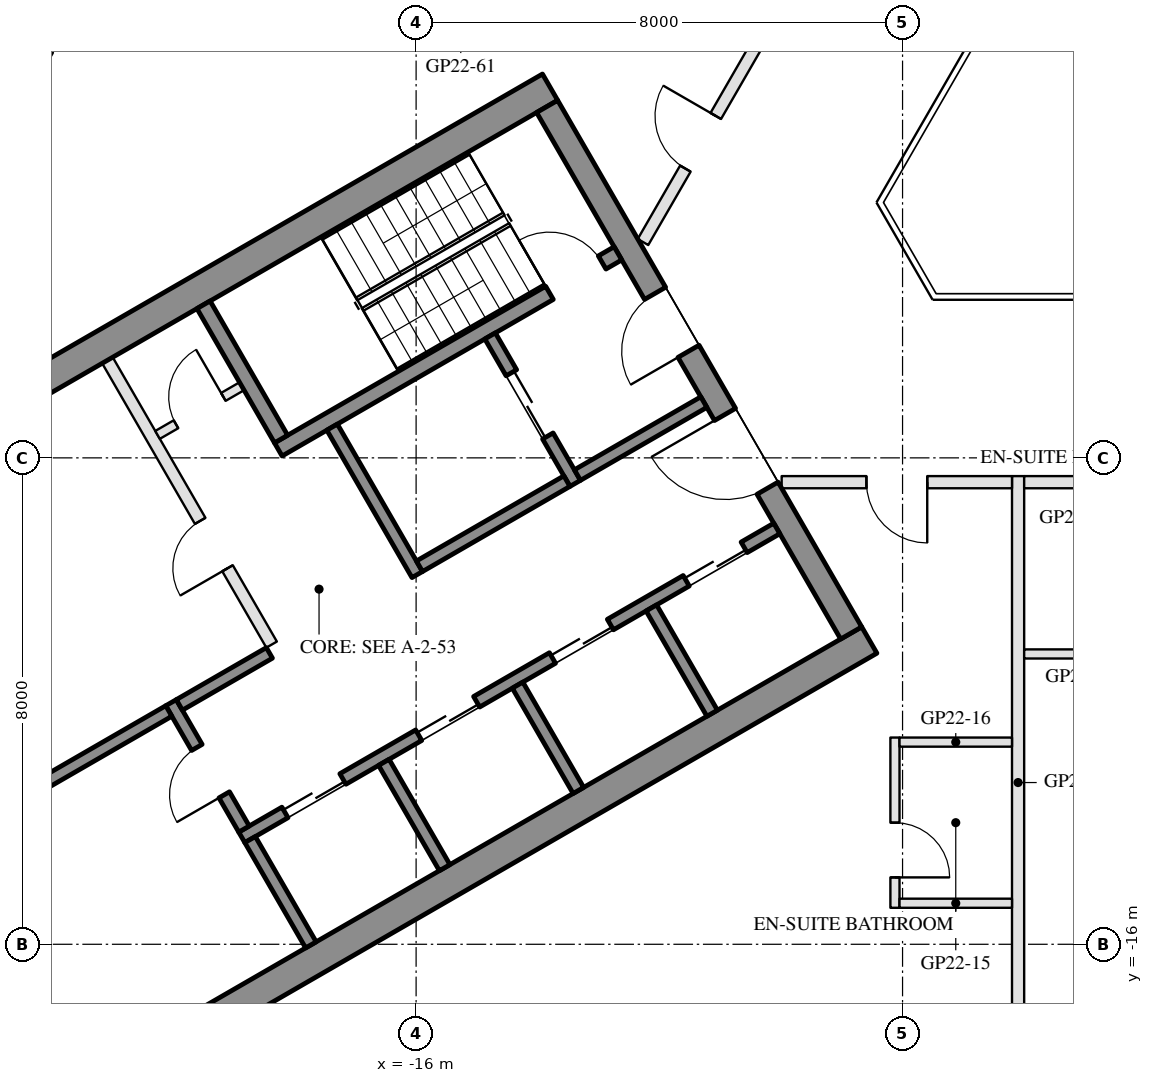
"""IFC4 building model, lengths in metres.
Left out: names, types, materials, properties, quantities, classifications, styles, units other than length and angle.
Written with IfcOpenShell. Run it as: python <this file> out.ifc"""

import sys

from ifc_helpers import new_model, si_unit, direction, frame, frame_2d, origin, place, context, subcontext, project, spatial, rectangle, extrude, element, fill, save


model = new_model("IFC4")
c1 = context("Model", 3, precision=1e-05, world=origin(), true_north=direction((0.0, 1.0)))
c2 = subcontext(c1, "Body", "Model", "MODEL_VIEW")
j1 = project(units=[si_unit("LENGTHUNIT", "METRE"), si_unit("PLANEANGLEUNIT", "RADIAN")], contexts=[c1])
p1 = place(None, origin())
s1 = spatial("IfcSite", under=j1, at=p1, CompositionType="ELEMENT")
p2 = place(p1, origin())
s2 = spatial("IfcBuilding", under=s1, at=p2, CompositionType="ELEMENT")
p3 = place(p2, frame((0.0, 0.0, 228.0)))
s3 = spatial("IfcBuildingStorey", under=s2, at=p3, CompositionType="ELEMENT", Elevation=228.0)
p4 = place(p3, frame((-20.309, 1.934, 0.0), z_axis=(0.0, 0.0, 1.0), x_axis=(-0.499992114976, -0.866029956157, 0.0)))
e1 = element("IfcWall", 1, at=p4, inside=s3, PredefinedType="SOLIDWALL", context=c2, shape_type="SweptSolid", body=[
    extrude(rectangle(XDim=6.74, YDim=0.35, at=frame_2d((3.37, 0.0))), origin(), (0.0, 0.0, 1.0), 3.45),
])
p5 = place(p4, frame((4.02, 0.0, 0.0)))
e2 = element("IfcOpeningElement", 2, at=p5, cuts=e1, PredefinedType="OPENING", context=c2, shape_type="SweptSolid", body=[
    extrude(rectangle(XDim=2.4, YDim=2.4, at=frame_2d((1.2, 1.2))), frame((0.0, 0.185, 0.0), z_axis=(0.0, -1.0, 0.0), x_axis=(1.0, 0.0, 0.0)), (0.0, 0.0, 1.0), 0.37),
])
p6 = place(p4, frame((0.77, 0.0, 0.3)))
e3 = element("IfcOpeningElement", 3, at=p6, cuts=e1, PredefinedType="OPENING", context=c2, shape_type="SweptSolid", body=[
    extrude(rectangle(XDim=2.9, YDim=2.65, at=frame_2d((1.45, 1.325))), frame((0.0, 0.185, 0.0), z_axis=(0.0, -1.0, 0.0), x_axis=(1.0, 0.0, 0.0)), (0.0, 0.0, 1.0), 0.37),
])
for number, where, z_axis, x_axis in (
    (4, (-13.797, -1.903, 0.0), (0.0, 0.0, 1.0), (-0.866, -0.5, 0.0)),
    (5, (-8.547, -10.997, 0.0), (0.0, 0.0, 1.0), (-0.866, -0.5, 0.0)),
):
    element("IfcWall", number, at=place(p3, frame(where, z_axis=z_axis, x_axis=x_axis)), inside=s3, PredefinedType="SHEAR", context=c2, shape_type="SweptSolid", body=[
        extrude(rectangle(XDim=14.837, YDim=0.5, at=frame_2d((7.418, 0.0))), origin(), (0.0, 0.0, 1.0), 3.45),
    ])
p7 = place(p3, frame((-13.845, -2.22, 0.0), z_axis=(0.0, 0.0, 1.0), x_axis=(0.500004234368, -0.866022959057, 0.0)))
e6 = element("IfcWall", 6, at=p7, inside=s3, PredefinedType="SHEAR", context=c2, shape_type="SweptSolid", body=[
    extrude(rectangle(XDim=10.0, YDim=0.4, at=frame_2d((5.0, 0.0))), origin(), (0.0, 0.0, 1.0), 3.45),
])
p8 = place(p7, frame((3.55, 0.0, 0.0)))
e7 = element("IfcOpeningElement", 7, at=p8, cuts=e6, PredefinedType="OPENING", context=c2, shape_type="SweptSolid", body=[
    extrude(rectangle(XDim=1.1, YDim=2.1, at=frame_2d((0.55, 1.05))), frame((0.0, 0.21, 0.0), z_axis=(0.0, -1.0, 0.0), x_axis=(1.0, 0.0, 0.0)), (0.0, 0.0, 1.0), 0.42),
])
p9 = place(p7, frame((5.85, 0.0, 0.0)))
e8 = element("IfcOpeningElement", 8, at=p9, cuts=e6, PredefinedType="OPENING", context=c2, shape_type="SweptSolid", body=[
    extrude(rectangle(XDim=1.4, YDim=2.1, at=frame_2d((0.7, 1.05))), frame((0.0, 0.21, 0.0), z_axis=(0.0, -1.0, 0.0), x_axis=(1.0, 0.0, 0.0)), (0.0, 0.0, 1.0), 0.42),
])
p10 = place(p3, frame((-12.681, -4.636, 0.0), z_axis=(0.0, 0.0, 1.0), x_axis=(-0.866021702275, -0.500006411147, 0.0)))
e9 = element("IfcWall", 9, at=p10, inside=s3, PredefinedType="SHEAR", context=c2, shape_type="SweptSolid", body=[
    extrude(rectangle(XDim=6.45, YDim=0.25, at=frame_2d((3.225, 0.0))), origin(), (0.0, 0.0, 1.0), 3.45),
])
p11 = place(p10, frame((0.3, 0.0, 0.0)))
e10 = element("IfcOpeningElement", 10, at=p11, cuts=e9, PredefinedType="OPENING", context=c2, shape_type="SweptSolid", body=[
    extrude(rectangle(XDim=1.0, YDim=2.1, at=frame_2d((0.5, 1.05))), frame((0.0, 0.135, 0.0), z_axis=(0.0, -1.0, 0.0), x_axis=(1.0, 0.0, 0.0)), (0.0, 0.0, 1.0), 0.27),
])
p12 = place(p3, frame((-19.496, -5.482, 0.0), z_axis=(0.0, 0.0, 1.0), x_axis=(0.499990435942, -0.866030925526, 0.0)))
e11 = element("IfcWall", 11, at=p12, inside=s3, PredefinedType="SHEAR", context=c2, shape_type="SweptSolid", body=[
    extrude(rectangle(XDim=2.55, YDim=0.25, at=frame_2d((1.275, 0.0))), origin(), (0.0, 0.0, 1.0), 3.45),
])
p13 = place(p3, frame((-17.381, -7.495, 0.0), z_axis=(0.0, 0.0, 1.0), x_axis=(0.500011755427, -0.866018616679, 0.0)))
e12 = element("IfcWall", 12, at=p13, inside=s3, PredefinedType="SHEAR", context=c2, shape_type="SweptSolid", body=[
    extrude(rectangle(XDim=2.8, YDim=0.2, at=frame_2d((1.4, 0.0))), origin(), (0.0, 0.0, 1.0), 3.45),
])
p14 = place(p3, frame((-14.783, -5.995, 0.0), z_axis=(0.0, 0.0, 1.0), x_axis=(0.49994636267, -0.866056369097, 0.0)))
e13 = element("IfcWall", 13, at=p14, inside=s3, PredefinedType="SHEAR", context=c2, shape_type="SweptSolid", body=[
    extrude(rectangle(XDim=2.8, YDim=0.2, at=frame_2d((1.4, 0.0))), origin(), (0.0, 0.0, 1.0), 3.45),
])
p15 = place(p14, frame((0.7, 0.0, 0.0)))
e14 = element("IfcOpeningElement", 14, at=p15, cuts=e13, PredefinedType="OPENING", context=c2, shape_type="SweptSolid", body=[
    extrude(rectangle(XDim=1.2, YDim=2.1, at=frame_2d((0.6, 1.05))), frame((0.0, 0.11, 0.0), z_axis=(0.0, -1.0, 0.0), x_axis=(1.0, 0.0, 0.0)), (0.0, 0.0, 1.0), 0.22),
])
p16 = place(p3, frame((-13.52, -8.383, 0.0), z_axis=(0.0, 0.0, 1.0), x_axis=(-0.866034573852, -0.49998411664, 0.0)))
e15 = element("IfcWall", 15, at=p16, inside=s3, PredefinedType="SHEAR", context=c2, shape_type="SweptSolid", body=[
    extrude(rectangle(XDim=2.8, YDim=0.2, at=frame_2d((1.4, 0.0))), origin(), (0.0, 0.0, 1.0), 3.45),
])
p17 = place(p3, frame((-11.268, -7.083, 0.0), z_axis=(0.0, 0.0, 1.0), x_axis=(-0.866050077142, -0.499957262057, 0.0)))
e16 = element("IfcWall", 16, at=p17, inside=s3, PredefinedType="SHEAR", context=c2, shape_type="SweptSolid", body=[
    extrude(rectangle(XDim=2.4, YDim=0.2, at=frame_2d((1.2, 0.0))), origin(), (0.0, 0.0, 1.0), 3.45),
])
p18 = place(p3, frame((-10.068, -9.162, 0.0), z_axis=(0.0, 0.0, 1.0), x_axis=(-0.866032725843, -0.499987317609, 0.0)))
e17 = element("IfcWall", 17, at=p18, inside=s3, PredefinedType="SHEAR", context=c2, shape_type="SweptSolid", body=[
    extrude(rectangle(XDim=10.16, YDim=0.2, at=frame_2d((5.08, 0.0))), origin(), (0.0, 0.0, 1.0), 3.45),
])
p19 = place(p18, frame((0.62, 0.0, 0.0)))
e18 = element("IfcOpeningElement", 18, at=p19, cuts=e17, PredefinedType="OPENING", context=c2, shape_type="SweptSolid", body=[
    extrude(rectangle(XDim=1.1, YDim=2.1, at=frame_2d((0.55, 1.05))), frame((0.0, 0.11, 0.0), z_axis=(0.0, -1.0, 0.0), x_axis=(1.0, 0.0, 0.0)), (0.0, 0.0, 1.0), 0.22),
])
p20 = place(p18, frame((3.16, 0.0, 0.0)))
e19 = element("IfcOpeningElement", 19, at=p20, cuts=e17, PredefinedType="OPENING", context=c2, shape_type="SweptSolid", body=[
    extrude(rectangle(XDim=1.1, YDim=2.1, at=frame_2d((0.55, 1.05))), frame((0.0, 0.11, 0.0), z_axis=(0.0, -1.0, 0.0), x_axis=(1.0, 0.0, 0.0)), (0.0, 0.0, 1.0), 0.22),
])
p21 = place(p18, frame((5.7, 0.0, 0.0)))
e20 = element("IfcOpeningElement", 20, at=p21, cuts=e17, PredefinedType="OPENING", context=c2, shape_type="SweptSolid", body=[
    extrude(rectangle(XDim=1.1, YDim=2.1, at=frame_2d((0.55, 1.05))), frame((0.0, 0.11, 0.0), z_axis=(0.0, -1.0, 0.0), x_axis=(1.0, 0.0, 0.0)), (0.0, 0.0, 1.0), 0.22),
])
p22 = place(p18, frame((8.24, 0.0, 0.0)))
e21 = element("IfcOpeningElement", 21, at=p22, cuts=e17, PredefinedType="OPENING", context=c2, shape_type="SweptSolid", body=[
    extrude(rectangle(XDim=1.1, YDim=2.1, at=frame_2d((0.55, 1.05))), frame((0.0, 0.11, 0.0), z_axis=(0.0, -1.0, 0.0), x_axis=(1.0, 0.0, 0.0)), (0.0, 0.0, 1.0), 0.22),
])
p23 = place(p3, frame((-20.031, -12.026, 0.0), z_axis=(0.0, 0.0, 1.0), x_axis=(0.500033551112, -0.866006032174, 0.0)))
e22 = element("IfcWall", 22, at=p23, inside=s3, PredefinedType="SHEAR", context=c2, shape_type="SweptSolid", body=[
    extrude(rectangle(XDim=2.4, YDim=0.2, at=frame_2d((1.2, 0.0))), origin(), (0.0, 0.0, 1.0), 3.45),
])
p24 = place(p23, frame((0.85, 0.0, 0.0)))
e23 = element("IfcOpeningElement", 23, at=p24, cuts=e22, PredefinedType="OPENING", context=c2, shape_type="SweptSolid", body=[
    extrude(rectangle(XDim=0.9, YDim=2.1, at=frame_2d((0.45, 1.05))), frame((0.0, 0.11, 0.0), z_axis=(0.0, -1.0, 0.0), x_axis=(1.0, 0.0, 0.0)), (0.0, 0.0, 1.0), 0.22),
])
p25 = place(p3, frame((-18.413, -11.208, 0.0), z_axis=(0.0, 0.0, 1.0), x_axis=(-0.866038183914, -0.499977863513, 0.0)))
e24 = element("IfcWall", 24, at=p25, inside=s3, PredefinedType="SHEAR", context=c2, shape_type="SweptSolid", body=[
    extrude(rectangle(XDim=1.71, YDim=0.2, at=frame_2d((0.855, 0.0))), origin(), (0.0, 0.0, 1.0), 3.45),
])
for number, where, z_axis, x_axis in (
    (25, (-12.131, -10.468, 0.0), (0.0, 0.0, 1.0), (0.5, -0.866, 0.0)),
    (26, (-14.331, -11.738, 0.0), (0.0, 0.0, 1.0), (0.5, -0.866, 0.0)),
    (27, (-16.531, -13.008, 0.0), (0.0, 0.0, 1.0), (0.5, -0.866, 0.0)),
    (28, (-18.73, -14.278, 0.0), (0.0, 0.0, 1.0), (0.5, -0.866, 0.0)),
):
    element("IfcWall", number, at=place(p3, frame(where, z_axis=z_axis, x_axis=x_axis)), inside=s3, PredefinedType="SHEAR", context=c2, shape_type="SweptSolid", body=[
        extrude(rectangle(XDim=2.0, YDim=0.2, at=frame_2d((1.0, 0.0))), origin(), (0.0, 0.0, 1.0), 3.45),
    ])
p26 = place(p3, frame((-20.067, -12.163, 0.0), z_axis=(0.0, 0.0, 1.0), x_axis=(-0.866055327414, -0.49994816717, 0.0)))
e29 = element("IfcWall", 29, at=p26, inside=s3, PredefinedType="SHEAR", context=c2, shape_type="SweptSolid", body=[
    extrude(rectangle(XDim=2.84, YDim=0.2, at=frame_2d((1.42, 0.0))), origin(), (0.0, 0.0, 1.0), 3.45),
])
p27 = place(p3, frame((-21.076, -6.395, 0.0), z_axis=(0.0, 0.0, 1.0), x_axis=(0.50001468107, -0.866016927499, 0.0)))
e30 = element("IfcWall", 30, at=p27, inside=s3, PredefinedType="PARTITIONING", context=c2, shape_type="SweptSolid", body=[
    extrude(rectangle(XDim=5.4, YDim=0.2, at=frame_2d((2.7, 0.0))), origin(), (0.0, 0.0, 1.0), 3.45),
])
p28 = place(p27, frame((3.05, 0.0, 0.0)))
e31 = element("IfcOpeningElement", 31, at=p28, cuts=e30, PredefinedType="OPENING", context=c2, shape_type="SweptSolid", body=[
    extrude(rectangle(XDim=0.9, YDim=2.1, at=frame_2d((0.45, 1.05))), frame((0.0, 0.11, 0.0), z_axis=(0.0, -1.0, 0.0), x_axis=(1.0, 0.0, 0.0)), (0.0, 0.0, 1.0), 0.22),
])
p29 = place(p3, frame((-18.866, -6.822, 0.0), z_axis=(0.0, 0.0, 1.0), x_axis=(-0.866028054938, -0.499995408039, 0.0)))
e32 = element("IfcWall", 32, at=p29, inside=s3, PredefinedType="PARTITIONING", context=c2, shape_type="SweptSolid", body=[
    extrude(rectangle(XDim=1.6, YDim=0.15, at=frame_2d((0.8, 0.0))), origin(), (0.0, 0.0, 1.0), 3.45),
])
p30 = place(p29, frame((0.35, 0.0, 0.0)))
e33 = element("IfcOpeningElement", 33, at=p30, cuts=e32, PredefinedType="OPENING", context=c2, shape_type="SweptSolid", body=[
    extrude(rectangle(XDim=0.9, YDim=2.1, at=frame_2d((0.45, 1.05))), frame((0.0, 0.085, 0.0), z_axis=(0.0, -1.0, 0.0), x_axis=(1.0, 0.0, 0.0)), (0.0, 0.0, 1.0), 0.17),
])
p31 = place(p3, frame((-6.1, -18.38, 0.0), z_axis=(0.0, 0.0, 1.0), x_axis=(0.0, 1.0, 0.0)))
e34 = element("IfcWall", 34, at=p31, inside=s3, PredefinedType="PARTITIONING", context=c2, shape_type="SweptSolid", body=[
    extrude(rectangle(XDim=10.08, YDim=0.2, at=frame_2d((5.04, 0.0))), origin(), (0.0, 0.0, 1.0), 2.96),
])
p32 = place(p3, frame((-6.2, -8.4, 0.0), z_axis=(0.0, 0.0, 1.0), x_axis=(-1.0, 0.0, 0.0)))
e35 = element("IfcWall", 35, at=p32, inside=s3, PredefinedType="PARTITIONING", context=c2, shape_type="SweptSolid", body=[
    extrude(rectangle(XDim=3.788, YDim=0.2, at=frame_2d((1.894, 0.0))), origin(), (0.0, 0.0, 1.0), 2.76),
])
p33 = place(p32, frame((1.394, 0.0, 0.0)))
e36 = element("IfcOpeningElement", 36, at=p33, cuts=e35, PredefinedType="OPENING", context=c2, shape_type="SweptSolid", body=[
    extrude(rectangle(XDim=1.0, YDim=2.1, at=frame_2d((0.5, 1.05))), frame((0.0, 0.11, 0.0), z_axis=(0.0, -1.0, 0.0), x_axis=(1.0, 0.0, 0.0)), (0.0, 0.0, 1.0), 0.22),
])
p34 = place(p3, frame((-8.125, -12.6, 0.0), z_axis=(0.0, 0.0, 1.0), x_axis=(0.0, -1.0, 0.0)))
e37 = element("IfcWall", 37, at=p34, inside=s3, PredefinedType="PARTITIONING", context=c2, shape_type="SweptSolid", body=[
    extrude(rectangle(XDim=2.8, YDim=0.15, at=frame_2d((1.4, 0.0))), origin(), (0.0, 0.0, 1.0), 3.45),
])
p35 = place(p34, frame((1.4, 0.0, 0.0)))
e38 = element("IfcOpeningElement", 38, at=p35, cuts=e37, PredefinedType="OPENING", context=c2, shape_type="SweptSolid", body=[
    extrude(rectangle(XDim=0.9, YDim=2.1, at=frame_2d((0.45, 1.05))), frame((0.0, 0.085, 0.0), z_axis=(0.0, -1.0, 0.0), x_axis=(1.0, 0.0, 0.0)), (0.0, 0.0, 1.0), 0.17),
])
for number, where, z_axis, x_axis in (
    (39, (-8.05, -15.325, 0.0), (0.0, 0.0, 1.0), (1.0, 0.0, 0.0)),
    (40, (-8.05, -12.675, 0.0), (0.0, 0.0, 1.0), (1.0, 0.0, 0.0)),
):
    element("IfcWall", number, at=place(p3, frame(where, z_axis=z_axis, x_axis=x_axis)), inside=s3, PredefinedType="PARTITIONING", context=c2, shape_type="SweptSolid", body=[
        extrude(rectangle(XDim=1.85, YDim=0.15, at=frame_2d((0.925, 0.0))), origin(), (0.0, 0.0, 1.0), 2.76),
    ])
p36 = place(p3, frame((-2.1, -8.4, 0.0), z_axis=(0.0, 0.0, 1.0), x_axis=(-1.0, 0.0, 0.0)))
e41 = element("IfcWall", 41, at=p36, inside=s3, PredefinedType="PARTITIONING", context=c2, shape_type="SweptSolid", body=[
    extrude(rectangle(XDim=3.9, YDim=0.2, at=frame_2d((1.95, 0.0))), origin(), (0.0, 0.0, 1.0), 2.76),
])
p37 = place(p36, frame((0.45, 0.0, 0.0)))
e42 = element("IfcOpeningElement", 42, at=p37, cuts=e41, PredefinedType="OPENING", context=c2, shape_type="SweptSolid", body=[
    extrude(rectangle(XDim=1.0, YDim=2.1, at=frame_2d((0.5, 1.05))), frame((0.0, 0.11, 0.0), z_axis=(0.0, -1.0, 0.0), x_axis=(1.0, 0.0, 0.0)), (0.0, 0.0, 1.0), 0.22),
])
p38 = place(p3, frame((-6.0, -11.225, 0.0), z_axis=(0.0, 0.0, 1.0), x_axis=(1.0, 0.0, 0.0)))
e43 = element("IfcWall", 43, at=p38, inside=s3, PredefinedType="PARTITIONING", context=c2, shape_type="SweptSolid", body=[
    extrude(rectangle(XDim=1.85, YDim=0.15, at=frame_2d((0.925, 0.0))), origin(), (0.0, 0.0, 1.0), 3.45),
])
p39 = place(p3, frame((-12.269, -4.45, 0.0), z_axis=(0.0, 0.0, 1.0), x_axis=(0.500055316652, 0.865993464345, 0.0)))
e44 = element("IfcWall", 44, at=p39, inside=s3, PredefinedType="PARTITIONING", context=c2, shape_type="SweptSolid", body=[
    extrude(rectangle(XDim=3.788, YDim=0.2, at=frame_2d((1.894, 0.0))), origin(), (0.0, 0.0, 1.0), 2.76),
])
p40 = place(p39, frame((1.394, 0.0, 0.0)))
e45 = element("IfcOpeningElement", 45, at=p40, cuts=e44, PredefinedType="OPENING", context=c2, shape_type="SweptSolid", body=[
    extrude(rectangle(XDim=1.0, YDim=2.1, at=frame_2d((0.5, 1.05))), frame((0.0, 0.11, 0.0), z_axis=(0.0, -1.0, 0.0), x_axis=(1.0, 0.0, 0.0)), (0.0, 0.0, 1.0), 0.22),
])
p41 = place(p15, origin())
e46 = element("IfcDoor", 46, at=p41, inside=s3, OperationType="DOUBLE_DOOR_SLIDING", PredefinedType="DOOR", context=c2, shape_type="SweptSolid", body=[
    extrude(rectangle(XDim=1.2, YDim=2.1, at=frame_2d((0.6, 1.05))), frame((0.0, 0.025, 0.0), z_axis=(0.0, -1.0, 0.0), x_axis=(1.0, 0.0, 0.0)), (0.0, 0.0, 1.0), 0.05),
])
fill(e14, e46)
p42 = place(p30, frame((0.9, 0.0, 0.0), z_axis=(0.0, 0.0, 1.0), x_axis=(-1.0, 0.0, 0.0)))
e47 = element("IfcDoor", 47, at=p42, inside=s3, OperationType="SINGLE_SWING_RIGHT", PredefinedType="DOOR", context=c2, shape_type="SweptSolid", body=[
    extrude(rectangle(XDim=0.9, YDim=2.1, at=frame_2d((0.45, 1.05))), frame((0.0, 0.025, 0.0), z_axis=(0.0, -1.0, 0.0), x_axis=(1.0, 0.0, 0.0)), (0.0, 0.0, 1.0), 0.05),
])
fill(e33, e47)
p43 = place(p19, origin())
e48 = element("IfcDoor", 48, at=p43, inside=s3, OperationType="DOUBLE_DOOR_SLIDING", PredefinedType="DOOR", context=c2, shape_type="SweptSolid", body=[
    extrude(rectangle(XDim=1.1, YDim=2.1, at=frame_2d((0.55, 1.05))), frame((0.0, 0.025, 0.0), z_axis=(0.0, -1.0, 0.0), x_axis=(1.0, 0.0, 0.0)), (0.0, 0.0, 1.0), 0.05),
])
fill(e18, e48)
p44 = place(p20, origin())
e49 = element("IfcDoor", 49, at=p44, inside=s3, OperationType="DOUBLE_DOOR_SLIDING", PredefinedType="DOOR", context=c2, shape_type="SweptSolid", body=[
    extrude(rectangle(XDim=1.1, YDim=2.1, at=frame_2d((0.55, 1.05))), frame((0.0, 0.025, 0.0), z_axis=(0.0, -1.0, 0.0), x_axis=(1.0, 0.0, 0.0)), (0.0, 0.0, 1.0), 0.05),
])
fill(e19, e49)
p45 = place(p21, origin())
e50 = element("IfcDoor", 50, at=p45, inside=s3, OperationType="DOUBLE_DOOR_SLIDING", PredefinedType="DOOR", context=c2, shape_type="SweptSolid", body=[
    extrude(rectangle(XDim=1.1, YDim=2.1, at=frame_2d((0.55, 1.05))), frame((0.0, 0.025, 0.0), z_axis=(0.0, -1.0, 0.0), x_axis=(1.0, 0.0, 0.0)), (0.0, 0.0, 1.0), 0.05),
])
fill(e20, e50)
p46 = place(p22, origin())
e51 = element("IfcDoor", 51, at=p46, inside=s3, OperationType="DOUBLE_DOOR_SLIDING", PredefinedType="DOOR", context=c2, shape_type="SweptSolid", body=[
    extrude(rectangle(XDim=1.1, YDim=2.1, at=frame_2d((0.55, 1.05))), frame((0.0, 0.025, 0.0), z_axis=(0.0, -1.0, 0.0), x_axis=(1.0, 0.0, 0.0)), (0.0, 0.0, 1.0), 0.05),
])
fill(e21, e51)
p47 = place(p24, frame((0.9, 0.0, 0.0), z_axis=(0.0, 0.0, 1.0), x_axis=(-1.0, 0.0, 0.0)))
e52 = element("IfcDoor", 52, at=p47, inside=s3, OperationType="SINGLE_SWING_LEFT", PredefinedType="DOOR", context=c2, shape_type="SweptSolid", body=[
    extrude(rectangle(XDim=0.9, YDim=2.1, at=frame_2d((0.45, 1.05))), frame((0.0, 0.025, 0.0), z_axis=(0.0, -1.0, 0.0), x_axis=(1.0, 0.0, 0.0)), (0.0, 0.0, 1.0), 0.05),
])
fill(e23, e52)
p48 = place(p28, frame((0.9, 0.0, 0.0), z_axis=(0.0, 0.0, 1.0), x_axis=(-1.0, 0.0, 0.0)))
e53 = element("IfcDoor", 53, at=p48, inside=s3, OperationType="SINGLE_SWING_LEFT", PredefinedType="DOOR", context=c2, shape_type="SweptSolid", body=[
    extrude(rectangle(XDim=0.9, YDim=2.1, at=frame_2d((0.45, 1.05))), frame((0.0, 0.025, 0.0), z_axis=(0.0, -1.0, 0.0), x_axis=(1.0, 0.0, 0.0)), (0.0, 0.0, 1.0), 0.05),
])
fill(e31, e53)
p49 = place(p8, frame((1.1, 0.0, 0.0), z_axis=(0.0, 0.0, 1.0), x_axis=(-1.0, 0.0, 0.0)))
e54 = element("IfcDoor", 54, at=p49, inside=s3, OperationType="SINGLE_SWING_LEFT", PredefinedType="DOOR", context=c2, shape_type="SweptSolid", body=[
    extrude(rectangle(XDim=1.1, YDim=2.1, at=frame_2d((0.55, 1.05))), frame((0.0, 0.025, 0.0), z_axis=(0.0, -1.0, 0.0), x_axis=(1.0, 0.0, 0.0)), (0.0, 0.0, 1.0), 0.05),
])
fill(e7, e54)
p50 = place(p9, frame((1.4, 0.0, 0.0), z_axis=(0.0, 0.0, 1.0), x_axis=(-1.0, 0.0, 0.0)))
e55 = element("IfcDoor", 55, at=p50, inside=s3, OperationType="DOUBLE_DOOR_SINGLE_SWING", PredefinedType="DOOR", context=c2, shape_type="SweptSolid", body=[
    extrude(rectangle(XDim=1.4, YDim=2.1, at=frame_2d((0.7, 1.05))), frame((0.0, 0.025, 0.0), z_axis=(0.0, -1.0, 0.0), x_axis=(1.0, 0.0, 0.0)), (0.0, 0.0, 1.0), 0.05),
])
fill(e8, e55)
p51 = place(p11, frame((1.0, 0.0, 0.0), z_axis=(0.0, 0.0, 1.0), x_axis=(-1.0, 0.0, 0.0)))
e56 = element("IfcDoor", 56, at=p51, inside=s3, OperationType="SINGLE_SWING_LEFT", PredefinedType="DOOR", context=c2, shape_type="SweptSolid", body=[
    extrude(rectangle(XDim=1.0, YDim=2.1, at=frame_2d((0.5, 1.05))), frame((0.0, 0.025, 0.0), z_axis=(0.0, -1.0, 0.0), x_axis=(1.0, 0.0, 0.0)), (0.0, 0.0, 1.0), 0.05),
])
fill(e10, e56)
p52 = place(p35, origin())
e57 = element("IfcDoor", 57, at=p52, inside=s3, OperationType="SINGLE_SWING_RIGHT", PredefinedType="DOOR", context=c2, shape_type="SweptSolid", body=[
    extrude(rectangle(XDim=0.9, YDim=2.1, at=frame_2d((0.45, 1.05))), frame((0.0, 0.025, 0.0), z_axis=(0.0, -1.0, 0.0), x_axis=(1.0, 0.0, 0.0)), (0.0, 0.0, 1.0), 0.05),
])
fill(e38, e57)
p53 = place(p33, origin())
e58 = element("IfcDoor", 58, at=p53, inside=s3, OperationType="SINGLE_SWING_LEFT", PredefinedType="DOOR", context=c2, shape_type="SweptSolid", body=[
    extrude(rectangle(XDim=1.0, YDim=2.1, at=frame_2d((0.5, 1.05))), frame((0.0, 0.025, 0.0), z_axis=(0.0, -1.0, 0.0), x_axis=(1.0, 0.0, 0.0)), (0.0, 0.0, 1.0), 0.05),
])
fill(e36, e58)
p54 = place(p40, origin())
e59 = element("IfcDoor", 59, at=p54, inside=s3, OperationType="SINGLE_SWING_RIGHT", PredefinedType="DOOR", context=c2, shape_type="SweptSolid", body=[
    extrude(rectangle(XDim=1.0, YDim=2.1, at=frame_2d((0.5, 1.05))), frame((0.0, 0.025, 0.0), z_axis=(0.0, -1.0, 0.0), x_axis=(1.0, 0.0, 0.0)), (0.0, 0.0, 1.0), 0.05),
])
fill(e45, e59)
save(model, sys.argv[1])
